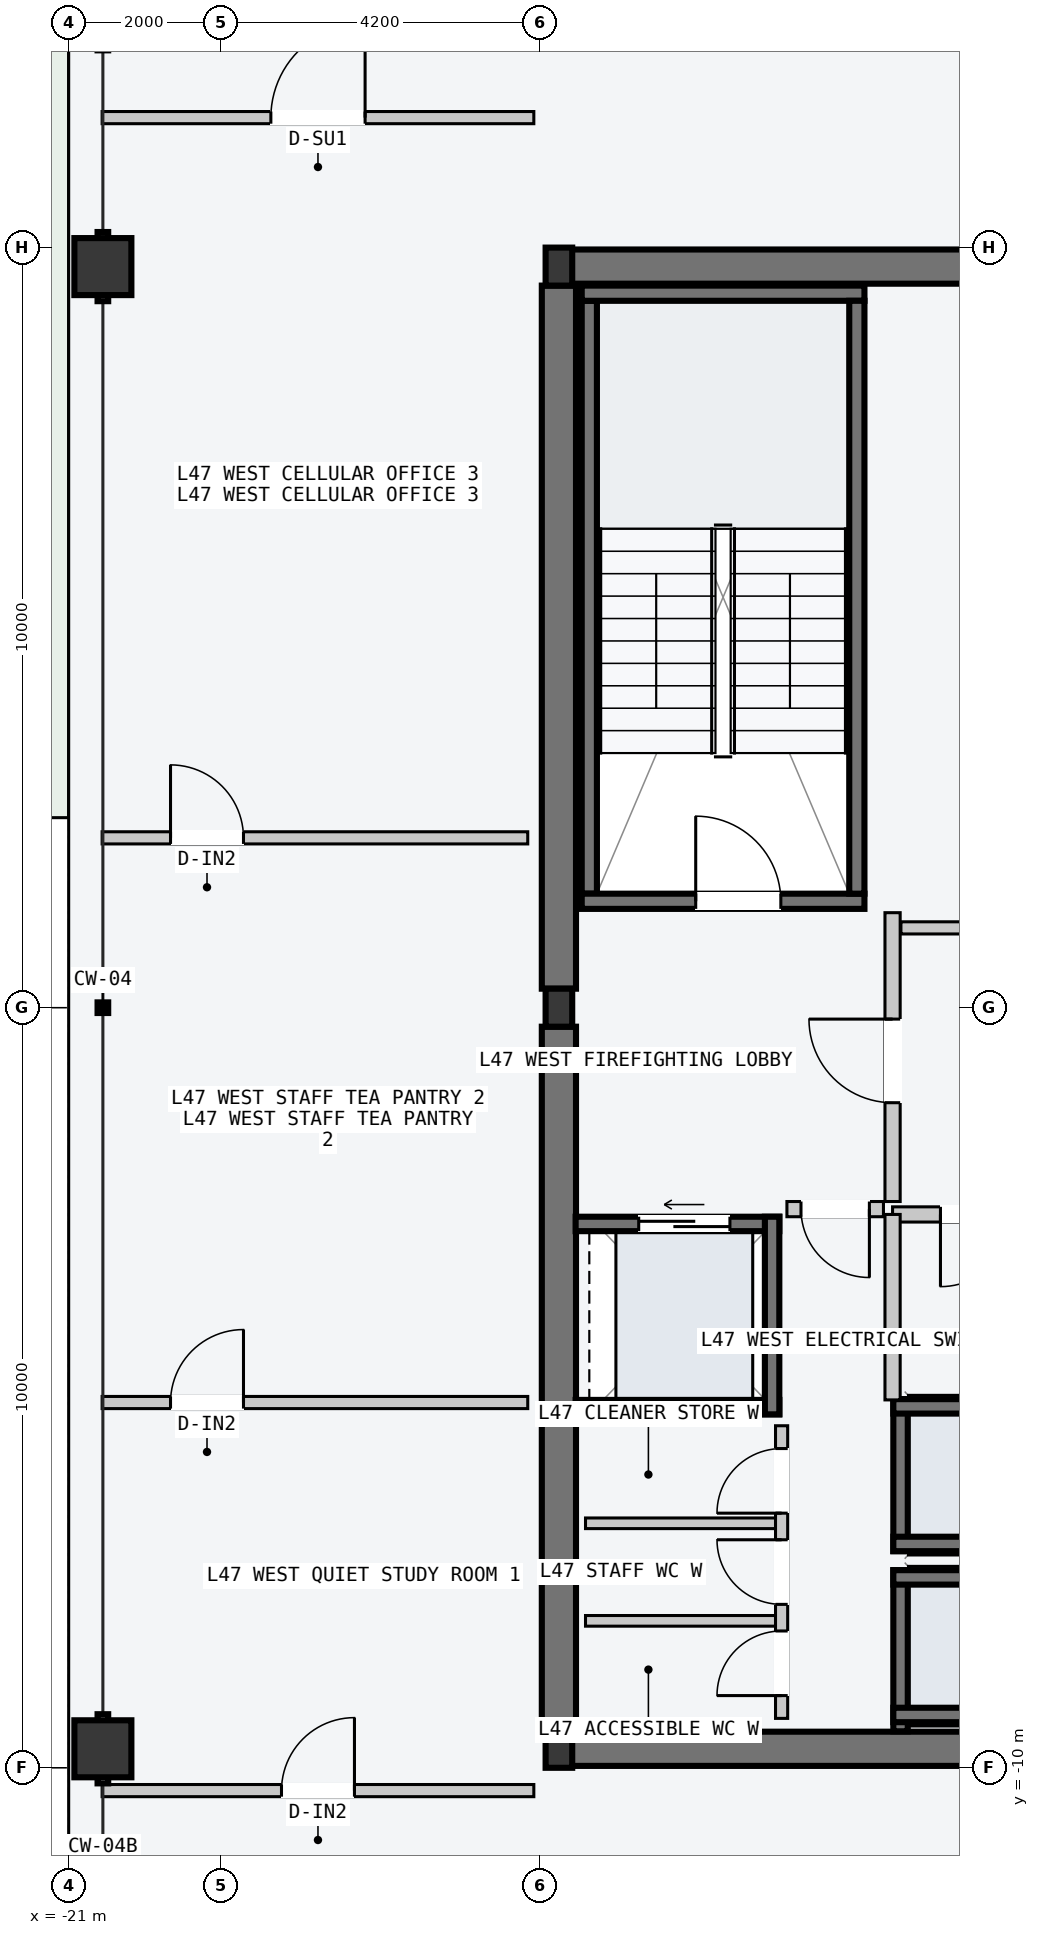
"""IFC4 building model, lengths in metres.
Left out: names, types, materials, properties, quantities, classifications, styles, units other than length and angle.
Written with IfcOpenShell. Run it as: python <this file> out.ifc"""

import sys

from ifc_helpers import new_model, si_unit, direction, frame, frame_2d, origin, origin_2d, place, context, subcontext, project, spatial, rectangle, hollow_rectangle, i_section, extrude, element, fill, save


model = new_model("IFC4")
c1 = context("Model", 3, precision=1e-05, world=origin(), true_north=direction((0.0, 1.0)))
c2 = subcontext(c1, "Body", "Model", "MODEL_VIEW")
j1 = project(units=[si_unit("LENGTHUNIT", "METRE"), si_unit("PLANEANGLEUNIT", "RADIAN")], contexts=[c1])
p1 = place(None, origin())
s1 = spatial("IfcSite", under=j1, at=p1, CompositionType="ELEMENT")
p2 = place(p1, origin())
s2 = spatial("IfcBuilding", under=s1, at=p2, CompositionType="ELEMENT")
p3 = place(p2, frame((0.0, 0.0, 180.3)))
s3 = spatial("IfcBuildingStorey", under=s2, at=p3, CompositionType="ELEMENT", Elevation=180.3)
for number, where, z_axis, x_axis in (
    (1, (-14.53, -9.75, -0.2), (0.0, 0.0, 1.0), (1.0, 0.0, 0.0)),
    (2, (-14.53, 9.75, -0.2), (0.0, 0.0, 1.0), (1.0, 0.0, 0.0)),
):
    element("IfcWall", number, at=place(p3, frame(where, z_axis=z_axis, x_axis=x_axis)), inside=s3, PredefinedType="SHEAR", context=c2, shape_type="SweptSolid", body=[
        extrude(rectangle(XDim=6.46, YDim=0.45, at=frame_2d((3.23, 0.0))), origin(), (0.0, 0.0, 1.0), 3.6),
    ])
for number, where, z_axis, x_axis in (
    (3, (-14.55, -9.5, -0.2), (0.0, 0.0, 1.0), (0.0, 1.0, 0.0)),
    (4, (-14.55, 0.25, -0.2), (0.0, 0.0, 1.0), (0.0, 1.0, 0.0)),
):
    element("IfcWall", number, at=place(p3, frame(where, z_axis=z_axis, x_axis=x_axis)), inside=s3, PredefinedType="SHEAR", context=c2, shape_type="SweptSolid", body=[
        extrude(rectangle(XDim=9.25, YDim=0.45, at=frame_2d((4.625, 0.0))), origin(), (0.0, 0.0, 1.0), 3.6),
    ])
p4 = place(p3, frame((-14.15, 1.5, -0.2), z_axis=(0.0, 0.0, 1.0), x_axis=(0.0, 1.0, 0.0)))
e5 = element("IfcWall", 5, at=p4, inside=s3, PredefinedType="SOLIDWALL", context=c2, shape_type="SweptSolid", body=[
    extrude(rectangle(XDim=7.8, YDim=0.2, at=frame_2d((3.9, 0.0))), origin(), (0.0, 0.0, 1.0), 3.6),
])
p5 = place(p3, frame((-14.25, 1.4, -0.2), z_axis=(0.0, 0.0, 1.0), x_axis=(1.0, 0.0, 0.0)))
e6 = element("IfcWall", 6, at=p5, inside=s3, PredefinedType="SOLIDWALL", context=c2, shape_type="SweptSolid", body=[
    extrude(rectangle(XDim=3.72, YDim=0.2, at=frame_2d((1.86, 0.0))), origin(), (0.0, 0.0, 1.0), 3.6),
])
p6 = place(p5, frame((1.5, 0.0, 0.2)))
e7 = element("IfcOpeningElement", 7, at=p6, cuts=e6, PredefinedType="OPENING", context=c2, shape_type="SweptSolid", body=[
    extrude(rectangle(XDim=1.12, YDim=2.18, at=frame_2d((0.56, 1.09))), frame((0.0, 0.11, 0.0), z_axis=(0.0, -1.0, 0.0), x_axis=(1.0, 0.0, 0.0)), (0.0, 0.0, 1.0), 0.22),
])
p7 = place(p3, frame((-14.25, 9.4, -0.2), z_axis=(0.0, 0.0, 1.0), x_axis=(1.0, 0.0, 0.0)))
e8 = element("IfcWall", 8, at=p7, inside=s3, PredefinedType="SOLIDWALL", context=c2, shape_type="SweptSolid", body=[
    extrude(rectangle(XDim=3.72, YDim=0.2, at=frame_2d((1.86, 0.0))), origin(), (0.0, 0.0, 1.0), 3.6),
])
p8 = place(p3, frame((-10.63, 1.5, -0.2), z_axis=(0.0, 0.0, 1.0), x_axis=(0.0, 1.0, 0.0)))
e9 = element("IfcWall", 9, at=p8, inside=s3, PredefinedType="SOLIDWALL", context=c2, shape_type="SweptSolid", body=[
    extrude(rectangle(XDim=7.8, YDim=0.2, at=frame_2d((3.9, 0.0))), origin(), (0.0, 0.0, 1.0), 3.6),
])
for number, where, z_axis, x_axis in (
    (10, (-14.55, -9.75, 0.0), (0.0, 0.0, 1.0), (1.0, 0.0, 0.0)),
    (11, (-14.55, 0.0, 0.0), (0.0, 0.0, 1.0), (1.0, 0.0, 0.0)),
    (12, (-14.55, 9.75, 0.0), (0.0, 0.0, 1.0), (1.0, 0.0, 0.0)),
):
    element("IfcColumn", number, at=place(p3, frame(where, z_axis=z_axis, x_axis=x_axis)), inside=s3, PredefinedType="COLUMN", context=c2, shape_type="SweptSolid", body=[
        extrude(i_section(OverallWidth=0.35, OverallDepth=0.5, WebThickness=0.02, FlangeThickness=0.032, at=origin_2d()), origin(), (0.0, 0.0, 1.0), 3.6),
    ])
for number, where, z_axis, x_axis in (
    (13, (-20.55, -9.75, 0.0), (0.0, 0.0, 1.0), (0.0, 1.0, 0.0)),
    (14, (-20.55, 9.75, 0.0), (0.0, 0.0, 1.0), (0.0, 1.0, 0.0)),
):
    element("IfcColumn", number, at=place(p3, frame(where, z_axis=z_axis, x_axis=x_axis)), inside=s3, PredefinedType="COLUMN", context=c2, shape_type="SweptSolid", body=[
        extrude(hollow_rectangle(XDim=0.75, YDim=0.75, WallThickness=0.032, at=origin_2d()), origin(), (0.0, 0.0, 1.0), 3.6),
    ])
p9 = place(p3, frame((-10.055, -9.52, -0.2), z_axis=(0.0, 0.0, 1.0), x_axis=(0.0, 1.0, 0.0)))
e15 = element("IfcWall", 15, at=p9, inside=s3, PredefinedType="SOLIDWALL", context=c2, shape_type="SweptSolid", body=[
    extrude(rectangle(XDim=2.12, YDim=0.19, at=frame_2d((1.06, 0.0))), origin(), (0.0, 0.0, 1.0), 3.6),
])
for number, where, z_axis, x_axis in (
    (16, (-10.15, -7.495, -0.2), (0.0, 0.0, 1.0), (1.0, 0.0, 0.0)),
    (17, (-10.15, -9.305, -0.2), (0.0, 0.0, 1.0), (1.0, 0.0, 0.0)),
):
    element("IfcWall", number, at=place(p3, frame(where, z_axis=z_axis, x_axis=x_axis)), inside=s3, PredefinedType="SOLIDWALL", context=c2, shape_type="SweptSolid", body=[
        extrude(rectangle(XDim=2.2, YDim=0.19, at=frame_2d((1.1, 0.0))), origin(), (0.0, 0.0, 1.0), 3.6),
    ])
p10 = place(p3, frame((-10.055, -7.15, -0.2), z_axis=(0.0, 0.0, 1.0), x_axis=(0.0, 1.0, 0.0)))
e18 = element("IfcWall", 18, at=p10, inside=s3, PredefinedType="SOLIDWALL", context=c2, shape_type="SweptSolid", body=[
    extrude(rectangle(XDim=2.0, YDim=0.19, at=frame_2d((1.0, 0.0))), origin(), (0.0, 0.0, 1.0), 3.6),
])
for number, where, z_axis, x_axis in (
    (19, (-10.15, -5.245, -0.2), (0.0, 0.0, 1.0), (1.0, 0.0, 0.0)),
    (20, (-10.15, -7.055, -0.2), (0.0, 0.0, 1.0), (1.0, 0.0, 0.0)),
):
    element("IfcWall", number, at=place(p3, frame(where, z_axis=z_axis, x_axis=x_axis)), inside=s3, PredefinedType="SOLIDWALL", context=c2, shape_type="SweptSolid", body=[
        extrude(rectangle(XDim=2.2, YDim=0.19, at=frame_2d((1.1, 0.0))), origin(), (0.0, 0.0, 1.0), 3.6),
    ])
p11 = place(p3, frame((-14.33, -2.845, -0.2), z_axis=(0.0, 0.0, 1.0), x_axis=(1.0, 0.0, 0.0)))
e21 = element("IfcWall", 21, at=p11, inside=s3, PredefinedType="SOLIDWALL", context=c2, shape_type="SweptSolid", body=[
    extrude(rectangle(XDim=2.68, YDim=0.19, at=frame_2d((1.34, 0.0))), origin(), (0.0, 0.0, 1.0), 3.6),
])
p12 = place(p11, frame((0.83, 0.0, 0.2)))
e22 = element("IfcOpeningElement", 22, at=p12, cuts=e21, PredefinedType="OPENING", context=c2, shape_type="SweptSolid", body=[
    extrude(rectangle(XDim=1.2, YDim=2.2, at=frame_2d((0.6, 1.1))), frame((0.0, 0.105, 0.0), z_axis=(0.0, -1.0, 0.0), x_axis=(1.0, 0.0, 0.0)), (0.0, 0.0, 1.0), 0.21),
])
p13 = place(p3, frame((-14.33, -5.255, -0.2), z_axis=(0.0, 0.0, 1.0), x_axis=(1.0, 0.0, 0.0)))
e23 = element("IfcWall", 23, at=p13, inside=s3, PredefinedType="SOLIDWALL", context=c2, shape_type="SweptSolid", body=[
    extrude(rectangle(XDim=2.68, YDim=0.19, at=frame_2d((1.34, 0.0))), origin(), (0.0, 0.0, 1.0), 3.6),
])
p14 = place(p3, frame((-11.745, -5.35, -0.2), z_axis=(0.0, 0.0, 1.0), x_axis=(0.0, 1.0, 0.0)))
e24 = element("IfcWall", 24, at=p14, inside=s3, PredefinedType="SOLIDWALL", context=c2, shape_type="SweptSolid", body=[
    extrude(rectangle(XDim=2.6, YDim=0.19, at=frame_2d((1.3, 0.0))), origin(), (0.0, 0.0, 1.0), 3.6),
])
p15 = place(p3, frame((-10.16, -2.55, 0.0), z_axis=(0.0, 0.0, 1.0), x_axis=(0.0, 1.0, 0.0)))
e25 = element("IfcWall", 25, at=p15, inside=s3, PredefinedType="PARTITIONING", context=c2, shape_type="SweptSolid", body=[
    extrude(rectangle(XDim=3.8, YDim=0.2, at=frame_2d((1.9, 0.0))), origin(), (0.0, 0.0, 1.0), 3.4),
])
p16 = place(p15, frame((1.3, 0.0, 0.0)))
e26 = element("IfcOpeningElement", 26, at=p16, cuts=e25, PredefinedType="OPENING", context=c2, shape_type="SweptSolid", body=[
    extrude(rectangle(XDim=1.1, YDim=2.15, at=frame_2d((0.55, 1.075))), frame((0.0, 0.11, 0.0), z_axis=(0.0, -1.0, 0.0), x_axis=(1.0, 0.0, 0.0)), (0.0, 0.0, 1.0), 0.22),
])
p17 = place(p3, frame((-10.28, -2.65, 0.0), z_axis=(0.0, 0.0, 1.0), x_axis=(-1.0, 0.0, 0.0)))
e27 = element("IfcWall", 27, at=p17, inside=s3, PredefinedType="PARTITIONING", context=c2, shape_type="SweptSolid", body=[
    extrude(rectangle(XDim=1.27, YDim=0.2, at=frame_2d((0.635, 0.0))), origin(), (0.0, 0.0, 1.0), 3.4),
])
p18 = place(p17, frame((0.185, 0.0, 0.0)))
e28 = element("IfcOpeningElement", 28, at=p18, cuts=e27, PredefinedType="OPENING", context=c2, shape_type="SweptSolid", body=[
    extrude(rectangle(XDim=0.9, YDim=2.15, at=frame_2d((0.45, 1.075))), frame((0.0, 0.11, 0.0), z_axis=(0.0, -1.0, 0.0), x_axis=(1.0, 0.0, 0.0)), (0.0, 0.0, 1.0), 0.22),
])
p19 = place(p3, frame((-7.96, -2.72, 0.0), z_axis=(0.0, 0.0, 1.0), x_axis=(-1.0, 0.0, 0.0)))
e29 = element("IfcWall", 29, at=p19, inside=s3, PredefinedType="PARTITIONING", context=c2, shape_type="SweptSolid", body=[
    extrude(rectangle(XDim=2.2, YDim=0.2, at=frame_2d((1.1, 0.0))), origin(), (0.0, 0.0, 1.0), 3.4),
])
p20 = place(p19, frame((0.62, 0.0, 0.0)))
e30 = element("IfcOpeningElement", 30, at=p20, cuts=e29, PredefinedType="OPENING", context=c2, shape_type="SweptSolid", body=[
    extrude(rectangle(XDim=0.95, YDim=2.1, at=frame_2d((0.475, 1.05))), frame((0.0, 0.11, 0.0), z_axis=(0.0, -1.0, 0.0), x_axis=(1.0, 0.0, 0.0)), (0.0, 0.0, 1.0), 0.22),
])
p21 = place(p3, frame((-10.16, -5.16, 0.0), z_axis=(0.0, 0.0, 1.0), x_axis=(0.0, 1.0, 0.0)))
e31 = element("IfcWall", 31, at=p21, inside=s3, PredefinedType="PARTITIONING", context=c2, shape_type="SweptSolid", body=[
    extrude(rectangle(XDim=2.44, YDim=0.2, at=frame_2d((1.22, 0.0))), origin(), (0.0, 0.0, 1.0), 3.4),
])
for number, where, z_axis, x_axis in (
    (32, (-11.7, -8.067, 0.0), (0.0, 0.0, 1.0), (-1.0, 0.0, 0.0)),
    (33, (-11.7, -6.783, 0.0), (0.0, 0.0, 1.0), (-1.0, 0.0, 0.0)),
):
    element("IfcWall", number, at=place(p3, frame(where, z_axis=z_axis, x_axis=x_axis)), inside=s3, PredefinedType="PARTITIONING", context=c2, shape_type="SweptSolid", body=[
        extrude(rectangle(XDim=2.5, YDim=0.14, at=frame_2d((1.25, 0.0))), origin(), (0.0, 0.0, 1.0), 3.4),
    ])
p22 = place(p3, frame((-11.62, -9.35, 0.0), z_axis=(0.0, 0.0, 1.0), x_axis=(0.0, 1.0, 0.0)))
e34 = element("IfcWall", 34, at=p22, inside=s3, PredefinedType="PARTITIONING", context=c2, shape_type="SweptSolid", body=[
    extrude(rectangle(XDim=3.85, YDim=0.16, at=frame_2d((1.925, 0.0))), origin(), (0.0, 0.0, 1.0), 3.4),
])
p23 = place(p22, frame((0.3, 0.0, 0.0)))
e35 = element("IfcOpeningElement", 35, at=p23, cuts=e34, PredefinedType="OPENING", context=c2, shape_type="SweptSolid", body=[
    extrude(rectangle(XDim=0.85, YDim=2.12, at=frame_2d((0.425, 1.06))), frame((0.0, 0.09, 0.0), z_axis=(0.0, -1.0, 0.0), x_axis=(1.0, 0.0, 0.0)), (0.0, 0.0, 1.0), 0.18),
])
p24 = place(p22, frame((1.5, 0.0, 0.0)))
e36 = element("IfcOpeningElement", 36, at=p24, cuts=e34, PredefinedType="OPENING", context=c2, shape_type="SweptSolid", body=[
    extrude(rectangle(XDim=0.85, YDim=2.12, at=frame_2d((0.425, 1.06))), frame((0.0, 0.09, 0.0), z_axis=(0.0, -1.0, 0.0), x_axis=(1.0, 0.0, 0.0)), (0.0, 0.0, 1.0), 0.18),
])
p25 = place(p22, frame((2.7, 0.0, 0.0)))
e37 = element("IfcOpeningElement", 37, at=p25, cuts=e34, PredefinedType="OPENING", context=c2, shape_type="SweptSolid", body=[
    extrude(rectangle(XDim=0.85, YDim=2.12, at=frame_2d((0.425, 1.06))), frame((0.0, 0.09, 0.0), z_axis=(0.0, -1.0, 0.0), x_axis=(1.0, 0.0, 0.0)), (0.0, 0.0, 1.0), 0.18),
])
p26 = place(p3, frame((-10.05, 1.05, 0.0), z_axis=(0.0, 0.0, 1.0), x_axis=(1.0, 0.0, 0.0)))
e38 = element("IfcWall", 38, at=p26, inside=s3, PredefinedType="PARTITIONING", context=c2, shape_type="SweptSolid", body=[
    extrude(rectangle(XDim=8.79, YDim=0.16, at=frame_2d((4.395, 0.0))), origin(), (0.0, 0.0, 1.0), 3.4),
])
p27 = place(p3, frame((-20.56, 11.71, 0.0), z_axis=(0.0, 0.0, 1.0), x_axis=(1.0, 0.0, 0.0)))
e39 = element("IfcWall", 39, at=p27, inside=s3, PredefinedType="PARTITIONING", context=c2, shape_type="SweptSolid", body=[
    extrude(rectangle(XDim=5.68, YDim=0.16, at=frame_2d((2.84, 0.0))), origin(), (0.0, 0.0, 1.0), 3.4),
])
p28 = place(p27, frame((2.22, 0.0, 0.0)))
e40 = element("IfcOpeningElement", 40, at=p28, cuts=e39, PredefinedType="OPENING", context=c2, shape_type="SweptSolid", body=[
    extrude(rectangle(XDim=1.24, YDim=2.24, at=frame_2d((0.62, 1.12))), frame((0.0, 0.09, 0.0), z_axis=(0.0, -1.0, 0.0), x_axis=(1.0, 0.0, 0.0)), (0.0, 0.0, 1.0), 0.18),
])
p29 = place(p3, frame((-20.56, -10.3, 0.0), z_axis=(0.0, 0.0, 1.0), x_axis=(1.0, 0.0, 0.0)))
e41 = element("IfcWall", 41, at=p29, inside=s3, PredefinedType="PARTITIONING", context=c2, shape_type="SweptSolid", body=[
    extrude(rectangle(XDim=5.68, YDim=0.16, at=frame_2d((2.84, 0.0))), origin(), (0.0, 0.0, 1.0), 3.4),
])
p30 = place(p29, frame((2.36, 0.0, 0.0)))
e42 = element("IfcOpeningElement", 42, at=p30, cuts=e41, PredefinedType="OPENING", context=c2, shape_type="SweptSolid", body=[
    extrude(rectangle(XDim=0.96, YDim=2.18, at=frame_2d((0.48, 1.09))), frame((0.0, 0.09, 0.0), z_axis=(0.0, -1.0, 0.0), x_axis=(1.0, 0.0, 0.0)), (0.0, 0.0, 1.0), 0.18),
])
p31 = place(p3, frame((-20.56, -5.195, 0.0), z_axis=(0.0, 0.0, 1.0), x_axis=(1.0, 0.0, 0.0)))
e43 = element("IfcWall", 43, at=p31, inside=s3, PredefinedType="PARTITIONING", context=c2, shape_type="SweptSolid", body=[
    extrude(rectangle(XDim=5.6, YDim=0.16, at=frame_2d((2.8, 0.0))), origin(), (0.0, 0.0, 1.0), 3.4),
])
p32 = place(p31, frame((0.9, 0.0, 0.0)))
e44 = element("IfcOpeningElement", 44, at=p32, cuts=e43, PredefinedType="OPENING", context=c2, shape_type="SweptSolid", body=[
    extrude(rectangle(XDim=0.96, YDim=2.18, at=frame_2d((0.48, 1.09))), frame((0.0, 0.09, 0.0), z_axis=(0.0, -1.0, 0.0), x_axis=(1.0, 0.0, 0.0)), (0.0, 0.0, 1.0), 0.18),
])
p33 = place(p3, frame((-20.56, 2.235, 0.0), z_axis=(0.0, 0.0, 1.0), x_axis=(1.0, 0.0, 0.0)))
e45 = element("IfcWall", 45, at=p33, inside=s3, PredefinedType="PARTITIONING", context=c2, shape_type="SweptSolid", body=[
    extrude(rectangle(XDim=5.6, YDim=0.16, at=frame_2d((2.8, 0.0))), origin(), (0.0, 0.0, 1.0), 3.4),
])
p34 = place(p33, frame((0.9, 0.0, 0.0)))
e46 = element("IfcOpeningElement", 46, at=p34, cuts=e45, PredefinedType="OPENING", context=c2, shape_type="SweptSolid", body=[
    extrude(rectangle(XDim=0.96, YDim=2.18, at=frame_2d((0.48, 1.09))), frame((0.0, 0.09, 0.0), z_axis=(0.0, -1.0, 0.0), x_axis=(1.0, 0.0, 0.0)), (0.0, 0.0, 1.0), 0.18),
])
p35 = place(p6, origin())
e47 = element("IfcDoor", 47, at=p35, inside=s3, OperationType="SINGLE_SWING_LEFT", PredefinedType="DOOR", context=c2, shape_type="SweptSolid", body=[
    extrude(rectangle(XDim=1.12, YDim=2.18, at=frame_2d((0.56, 1.09))), frame((0.0, 0.025, 0.0), z_axis=(0.0, -1.0, 0.0), x_axis=(1.0, 0.0, 0.0)), (0.0, 0.0, 1.0), 0.05),
])
fill(e7, e47)
p36 = place(p12, origin())
e48 = element("IfcDoor", 48, at=p36, inside=s3, OperationType="SLIDING_TO_LEFT", PredefinedType="DOOR", context=c2, shape_type="SweptSolid", body=[
    extrude(rectangle(XDim=1.2, YDim=2.2, at=frame_2d((0.6, 1.1))), frame((0.0, 0.025, 0.0), z_axis=(0.0, -1.0, 0.0), x_axis=(1.0, 0.0, 0.0)), (0.0, 0.0, 1.0), 0.05),
])
fill(e22, e48)
p37 = place(p16, origin())
e49 = element("IfcDoor", 49, at=p37, inside=s3, OperationType="SINGLE_SWING_RIGHT", PredefinedType="DOOR", context=c2, shape_type="SweptSolid", body=[
    extrude(rectangle(XDim=1.1, YDim=2.15, at=frame_2d((0.55, 1.075))), frame((0.0, 0.025, 0.0), z_axis=(0.0, -1.0, 0.0), x_axis=(1.0, 0.0, 0.0)), (0.0, 0.0, 1.0), 0.05),
])
fill(e26, e49)
p38 = place(p18, origin())
e50 = element("IfcDoor", 50, at=p38, inside=s3, OperationType="SINGLE_SWING_LEFT", PredefinedType="DOOR", context=c2, shape_type="SweptSolid", body=[
    extrude(rectangle(XDim=0.9, YDim=2.15, at=frame_2d((0.45, 1.075))), frame((0.0, 0.025, 0.0), z_axis=(0.0, -1.0, 0.0), x_axis=(1.0, 0.0, 0.0)), (0.0, 0.0, 1.0), 0.05),
])
fill(e28, e50)
p39 = place(p20, origin())
e51 = element("IfcDoor", 51, at=p39, inside=s3, OperationType="SINGLE_SWING_RIGHT", PredefinedType="DOOR", context=c2, shape_type="SweptSolid", body=[
    extrude(rectangle(XDim=0.95, YDim=2.1, at=frame_2d((0.475, 1.05))), frame((0.0, 0.025, 0.0), z_axis=(0.0, -1.0, 0.0), x_axis=(1.0, 0.0, 0.0)), (0.0, 0.0, 1.0), 0.05),
])
fill(e30, e51)
p40 = place(p23, origin())
e52 = element("IfcDoor", 52, at=p40, inside=s3, OperationType="SINGLE_SWING_LEFT", PredefinedType="DOOR", context=c2, shape_type="SweptSolid", body=[
    extrude(rectangle(XDim=0.85, YDim=2.12, at=frame_2d((0.425, 1.06))), frame((0.0, 0.025, 0.0), z_axis=(0.0, -1.0, 0.0), x_axis=(1.0, 0.0, 0.0)), (0.0, 0.0, 1.0), 0.05),
])
fill(e35, e52)
p41 = place(p24, origin())
e53 = element("IfcDoor", 53, at=p41, inside=s3, OperationType="SINGLE_SWING_RIGHT", PredefinedType="DOOR", context=c2, shape_type="SweptSolid", body=[
    extrude(rectangle(XDim=0.85, YDim=2.12, at=frame_2d((0.425, 1.06))), frame((0.0, 0.025, 0.0), z_axis=(0.0, -1.0, 0.0), x_axis=(1.0, 0.0, 0.0)), (0.0, 0.0, 1.0), 0.05),
])
fill(e36, e53)
p42 = place(p25, origin())
e54 = element("IfcDoor", 54, at=p42, inside=s3, OperationType="SINGLE_SWING_LEFT", PredefinedType="DOOR", context=c2, shape_type="SweptSolid", body=[
    extrude(rectangle(XDim=0.85, YDim=2.12, at=frame_2d((0.425, 1.06))), frame((0.0, 0.025, 0.0), z_axis=(0.0, -1.0, 0.0), x_axis=(1.0, 0.0, 0.0)), (0.0, 0.0, 1.0), 0.05),
])
fill(e37, e54)
p43 = place(p28, origin())
e55 = element("IfcDoor", 55, at=p43, inside=s3, OperationType="SINGLE_SWING_RIGHT", PredefinedType="DOOR", context=c2, shape_type="SweptSolid", body=[
    extrude(rectangle(XDim=1.24, YDim=2.24, at=frame_2d((0.62, 1.12))), frame((0.0, 0.025, 0.0), z_axis=(0.0, -1.0, 0.0), x_axis=(1.0, 0.0, 0.0)), (0.0, 0.0, 1.0), 0.05),
])
fill(e40, e55)
p44 = place(p30, origin())
e56 = element("IfcDoor", 56, at=p44, inside=s3, OperationType="SINGLE_SWING_RIGHT", PredefinedType="DOOR", context=c2, shape_type="SweptSolid", body=[
    extrude(rectangle(XDim=0.96, YDim=2.18, at=frame_2d((0.48, 1.09))), frame((0.0, 0.025, 0.0), z_axis=(0.0, -1.0, 0.0), x_axis=(1.0, 0.0, 0.0)), (0.0, 0.0, 1.0), 0.05),
])
fill(e42, e56)
p45 = place(p32, origin())
e57 = element("IfcDoor", 57, at=p45, inside=s3, OperationType="SINGLE_SWING_RIGHT", PredefinedType="DOOR", context=c2, shape_type="SweptSolid", body=[
    extrude(rectangle(XDim=0.96, YDim=2.18, at=frame_2d((0.48, 1.09))), frame((0.0, 0.025, 0.0), z_axis=(0.0, -1.0, 0.0), x_axis=(1.0, 0.0, 0.0)), (0.0, 0.0, 1.0), 0.05),
])
fill(e44, e57)
p46 = place(p34, origin())
e58 = element("IfcDoor", 58, at=p46, inside=s3, OperationType="SINGLE_SWING_LEFT", PredefinedType="DOOR", context=c2, shape_type="SweptSolid", body=[
    extrude(rectangle(XDim=0.96, YDim=2.18, at=frame_2d((0.48, 1.09))), frame((0.0, 0.025, 0.0), z_axis=(0.0, -1.0, 0.0), x_axis=(1.0, 0.0, 0.0)), (0.0, 0.0, 1.0), 0.05),
])
fill(e46, e58)
save(model, sys.argv[1])
